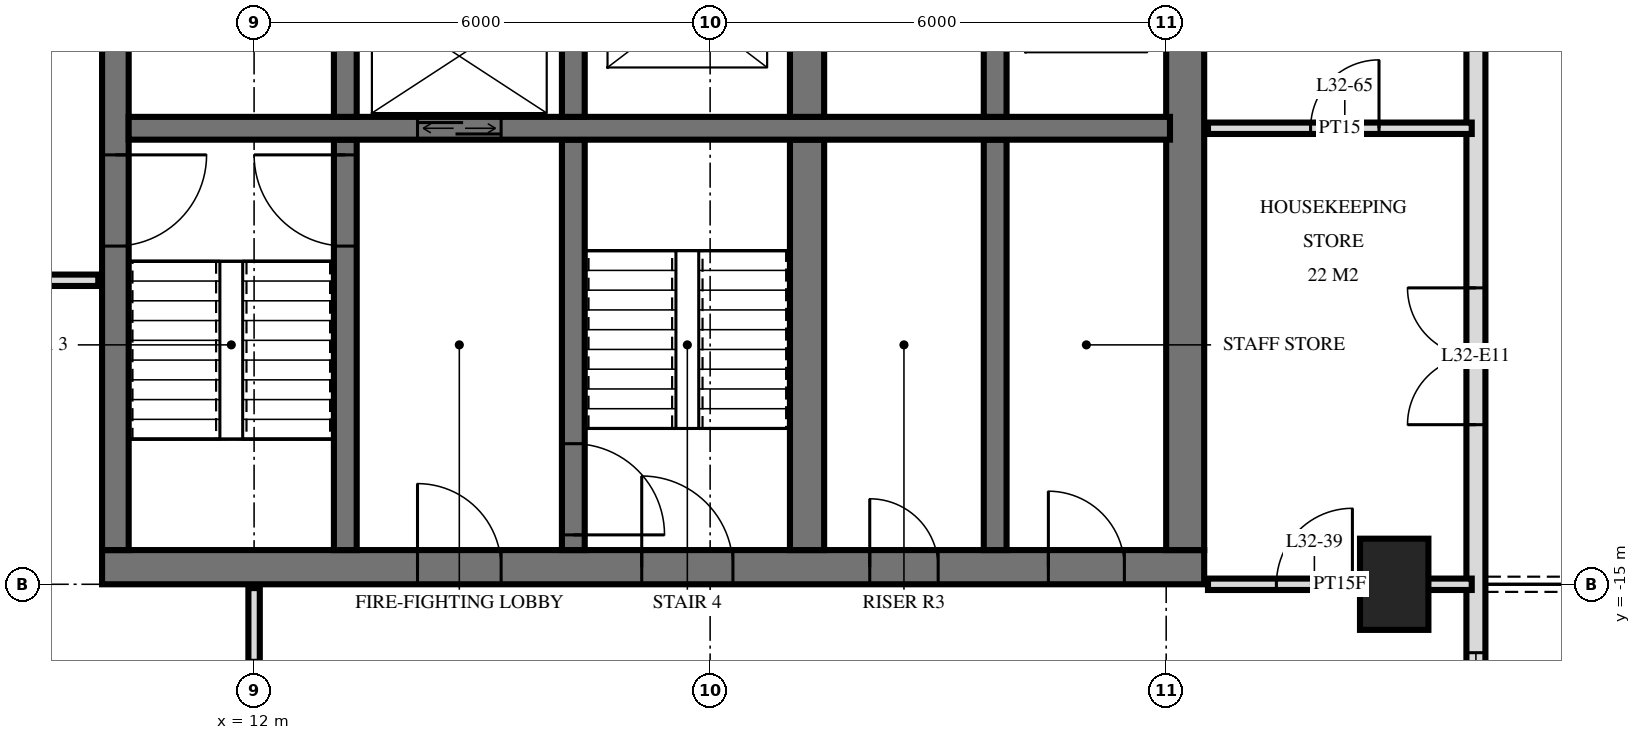
"""IFC4 building model, lengths in metres.
Left out: names, types, materials, properties, quantities, classifications, styles, units other than length and angle.
Written with IfcOpenShell. Run it as: python <this file> out.ifc"""

import sys

from ifc_helpers import new_model, si_unit, direction, frame, frame_2d, origin, origin_2d, place, context, subcontext, project, spatial, rectangle, extrude, element, fill, save


model = new_model("IFC4")
c1 = context("Model", 3, precision=1e-05, world=origin(), true_north=direction((0.0, 1.0)))
c2 = subcontext(c1, "Body", "Model", "MODEL_VIEW")
j1 = project(units=[si_unit("LENGTHUNIT", "METRE"), si_unit("PLANEANGLEUNIT", "RADIAN")], contexts=[c1])
p1 = place(None, origin())
s1 = spatial("IfcSite", under=j1, at=p1, CompositionType="ELEMENT")
p2 = place(p1, origin())
s2 = spatial("IfcBuilding", under=s1, at=p2, CompositionType="ELEMENT")
p3 = place(p2, frame((0.0, 0.0, 127.2)))
s3 = spatial("IfcBuildingStorey", under=s2, at=p3, CompositionType="ELEMENT", Elevation=127.2)
p4 = place(p3, frame((27.0, -15.0, 0.0), z_axis=(0.0, 0.0, 1.0), x_axis=(0.0, 1.0, 0.0)))
e1 = element("IfcColumn", 1, at=p4, inside=s3, PredefinedType="COLUMN", context=c2, shape_type="SweptSolid", body=[
    extrude(rectangle(XDim=1.2, YDim=0.9, at=origin_2d()), origin(), (0.0, 0.0, 1.0), 3.6),
])
p5 = place(p3, frame((10.0, -14.775, 0.0), z_axis=(0.0, 0.0, 1.0), x_axis=(1.0, 0.0, 0.0)))
e2 = element("IfcWall", 2, at=p5, inside=s3, PredefinedType="SHEAR", context=c2, shape_type="SweptSolid", body=[
    extrude(rectangle(XDim=14.5, YDim=0.45, at=frame_2d((7.25, 0.0))), origin(), (0.0, 0.0, 1.0), 3.6),
])
p6 = place(p5, frame((7.1, 0.0, 0.0)))
e3 = element("IfcOpeningElement", 3, at=p6, cuts=e2, PredefinedType="OPENING", context=c2, shape_type="SweptSolid", body=[
    extrude(rectangle(XDim=1.2, YDim=2.1, at=frame_2d((0.6, 1.05))), frame((0.0, 0.235, 0.0), z_axis=(0.0, -1.0, 0.0), x_axis=(1.0, 0.0, 0.0)), (0.0, 0.0, 1.0), 0.47),
])
p7 = place(p5, frame((4.15, 0.0, 0.0)))
e4 = element("IfcOpeningElement", 4, at=p7, cuts=e2, PredefinedType="OPENING", context=c2, shape_type="SweptSolid", body=[
    extrude(rectangle(XDim=1.1, YDim=2.1, at=frame_2d((0.55, 1.05))), frame((0.0, 0.235, 0.0), z_axis=(0.0, -1.0, 0.0), x_axis=(1.0, 0.0, 0.0)), (0.0, 0.0, 1.0), 0.47),
])
p8 = place(p5, frame((10.1, 0.0, 0.0)))
e5 = element("IfcOpeningElement", 5, at=p8, cuts=e2, PredefinedType="OPENING", context=c2, shape_type="SweptSolid", body=[
    extrude(rectangle(XDim=0.9, YDim=2.1, at=frame_2d((0.45, 1.05))), frame((0.0, 0.235, 0.0), z_axis=(0.0, -1.0, 0.0), x_axis=(1.0, 0.0, 0.0)), (0.0, 0.0, 1.0), 0.47),
])
p9 = place(p5, frame((12.45, 0.0, 0.0)))
e6 = element("IfcOpeningElement", 6, at=p9, cuts=e2, PredefinedType="OPENING", context=c2, shape_type="SweptSolid", body=[
    extrude(rectangle(XDim=1.0, YDim=2.1, at=frame_2d((0.5, 1.05))), frame((0.0, 0.235, 0.0), z_axis=(0.0, -1.0, 0.0), x_axis=(1.0, 0.0, 0.0)), (0.0, 0.0, 1.0), 0.47),
])
p10 = place(p3, frame((10.175, -14.55, 0.0), z_axis=(0.0, 0.0, 1.0), x_axis=(0.0, 1.0, 0.0)))
e7 = element("IfcWall", 7, at=p10, inside=s3, PredefinedType="SHEAR", context=c2, shape_type="SweptSolid", body=[
    extrude(rectangle(XDim=14.1, YDim=0.35, at=frame_2d((7.05, 0.0))), origin(), (0.0, 0.0, 1.0), 3.6),
])
p11 = place(p10, frame((8.4, 0.0, 0.0)))
e8 = element("IfcOpeningElement", 8, at=p11, cuts=e7, PredefinedType="OPENING", context=c2, shape_type="SweptSolid", body=[
    extrude(rectangle(XDim=1.4, YDim=2.4, at=frame_2d((0.7, 1.2))), frame((0.0, 0.185, 0.0), z_axis=(0.0, -1.0, 0.0), x_axis=(1.0, 0.0, 0.0)), (0.0, 0.0, 1.0), 0.37),
])
p12 = place(p10, frame((10.0, 0.0, 0.0)))
e9 = element("IfcOpeningElement", 9, at=p12, cuts=e7, PredefinedType="OPENING", context=c2, shape_type="SweptSolid", body=[
    extrude(rectangle(XDim=1.4, YDim=2.4, at=frame_2d((0.7, 1.2))), frame((0.0, 0.185, 0.0), z_axis=(0.0, -1.0, 0.0), x_axis=(1.0, 0.0, 0.0)), (0.0, 0.0, 1.0), 0.37),
])
p13 = place(p10, frame((4.0, 0.0, 0.0)))
e10 = element("IfcOpeningElement", 10, at=p13, cuts=e7, PredefinedType="OPENING", context=c2, shape_type="SweptSolid", body=[
    extrude(rectangle(XDim=1.2, YDim=2.1, at=frame_2d((0.6, 1.05))), frame((0.0, 0.185, 0.0), z_axis=(0.0, -1.0, 0.0), x_axis=(1.0, 0.0, 0.0)), (0.0, 0.0, 1.0), 0.37),
])
p14 = place(p3, frame((24.25, -14.55, 0.0), z_axis=(0.0, 0.0, 1.0), x_axis=(0.0, 1.0, 0.0)))
e11 = element("IfcWall", 11, at=p14, inside=s3, PredefinedType="SHEAR", context=c2, shape_type="SweptSolid", body=[
    extrude(rectangle(XDim=14.1, YDim=0.5, at=frame_2d((7.05, 0.0))), origin(), (0.0, 0.0, 1.0), 3.6),
])
p15 = place(p3, frame((10.35, -9.0, 0.0), z_axis=(0.0, 0.0, 1.0), x_axis=(1.0, 0.0, 0.0)))
e12 = element("IfcWall", 12, at=p15, inside=s3, PredefinedType="SHEAR", context=c2, shape_type="SweptSolid", body=[
    extrude(rectangle(XDim=13.7, YDim=0.3, at=frame_2d((6.85, 0.0))), origin(), (0.0, 0.0, 1.0), 3.6),
])
p16 = place(p15, frame((3.8, 0.0, 0.0)))
e13 = element("IfcOpeningElement", 13, at=p16, cuts=e12, PredefinedType="OPENING", context=c2, shape_type="SweptSolid", body=[
    extrude(rectangle(XDim=1.1, YDim=2.1, at=frame_2d((0.55, 1.05))), frame((0.0, 0.16, 0.0), z_axis=(0.0, -1.0, 0.0), x_axis=(1.0, 0.0, 0.0)), (0.0, 0.0, 1.0), 0.32),
])
p17 = place(p3, frame((13.2, -8.85, 0.0), z_axis=(0.0, 0.0, 1.0), x_axis=(0.0, 1.0, 0.0)))
e14 = element("IfcWall", 14, at=p17, inside=s3, PredefinedType="SHEAR", context=c2, shape_type="SweptSolid", body=[
    extrude(rectangle(XDim=2.3, YDim=0.3, at=frame_2d((1.15, 0.0))), origin(), (0.0, 0.0, 1.0), 3.6),
])
p18 = place(p3, frame((13.2, -14.55, 0.0), z_axis=(0.0, 0.0, 1.0), x_axis=(0.0, 1.0, 0.0)))
e15 = element("IfcWall", 15, at=p18, inside=s3, PredefinedType="SHEAR", context=c2, shape_type="SweptSolid", body=[
    extrude(rectangle(XDim=5.4, YDim=0.3, at=frame_2d((2.7, 0.0))), origin(), (0.0, 0.0, 1.0), 3.6),
])
p19 = place(p18, frame((4.0, 0.0, 0.0)))
e16 = element("IfcOpeningElement", 16, at=p19, cuts=e15, PredefinedType="OPENING", context=c2, shape_type="SweptSolid", body=[
    extrude(rectangle(XDim=1.2, YDim=2.1, at=frame_2d((0.6, 1.05))), frame((0.0, 0.16, 0.0), z_axis=(0.0, -1.0, 0.0), x_axis=(1.0, 0.0, 0.0)), (0.0, 0.0, 1.0), 0.32),
])
p20 = place(p3, frame((16.2, -8.85, 0.0), z_axis=(0.0, 0.0, 1.0), x_axis=(0.0, 1.0, 0.0)))
e17 = element("IfcWall", 17, at=p20, inside=s3, PredefinedType="SHEAR", context=c2, shape_type="SweptSolid", body=[
    extrude(rectangle(XDim=2.3, YDim=0.3, at=frame_2d((1.15, 0.0))), origin(), (0.0, 0.0, 1.0), 3.6),
])
p21 = place(p3, frame((16.2, -14.55, 0.0), z_axis=(0.0, 0.0, 1.0), x_axis=(0.0, 1.0, 0.0)))
e18 = element("IfcWall", 18, at=p21, inside=s3, PredefinedType="SHEAR", context=c2, shape_type="SweptSolid", body=[
    extrude(rectangle(XDim=5.4, YDim=0.3, at=frame_2d((2.7, 0.0))), origin(), (0.0, 0.0, 1.0), 3.6),
])
p22 = place(p21, frame((0.2, 0.0, 0.0)))
e19 = element("IfcOpeningElement", 19, at=p22, cuts=e18, PredefinedType="OPENING", context=c2, shape_type="SweptSolid", body=[
    extrude(rectangle(XDim=1.2, YDim=2.1, at=frame_2d((0.6, 1.05))), frame((0.0, 0.16, 0.0), z_axis=(0.0, -1.0, 0.0), x_axis=(1.0, 0.0, 0.0)), (0.0, 0.0, 1.0), 0.32),
])
p23 = place(p3, frame((19.275, -8.85, 0.0), z_axis=(0.0, 0.0, 1.0), x_axis=(0.0, 1.0, 0.0)))
e20 = element("IfcWall", 20, at=p23, inside=s3, PredefinedType="SHEAR", context=c2, shape_type="SweptSolid", body=[
    extrude(rectangle(XDim=2.3, YDim=0.45, at=frame_2d((1.15, 0.0))), origin(), (0.0, 0.0, 1.0), 3.6),
])
p24 = place(p3, frame((19.275, -14.55, 0.0), z_axis=(0.0, 0.0, 1.0), x_axis=(0.0, 1.0, 0.0)))
e21 = element("IfcWall", 21, at=p24, inside=s3, PredefinedType="SHEAR", context=c2, shape_type="SweptSolid", body=[
    extrude(rectangle(XDim=5.4, YDim=0.45, at=frame_2d((2.7, 0.0))), origin(), (0.0, 0.0, 1.0), 3.6),
])
p25 = place(p3, frame((21.75, -8.85, 0.0), z_axis=(0.0, 0.0, 1.0), x_axis=(0.0, 1.0, 0.0)))
e22 = element("IfcWall", 22, at=p25, inside=s3, PredefinedType="SHEAR", context=c2, shape_type="SweptSolid", body=[
    extrude(rectangle(XDim=2.3, YDim=0.3, at=frame_2d((1.15, 0.0))), origin(), (0.0, 0.0, 1.0), 3.6),
])
p26 = place(p3, frame((21.75, -14.55, 0.0), z_axis=(0.0, 0.0, 1.0), x_axis=(0.0, 1.0, 0.0)))
e23 = element("IfcWall", 23, at=p26, inside=s3, PredefinedType="SHEAR", context=c2, shape_type="SweptSolid", body=[
    extrude(rectangle(XDim=5.4, YDim=0.3, at=frame_2d((2.7, 0.0))), origin(), (0.0, 0.0, 1.0), 3.6),
])
p27 = place(p3, frame((28.075, -29.275, 0.0), z_axis=(0.0, 0.0, 1.0), x_axis=(0.0, 1.0, 0.0)))
e24 = element("IfcWall", 24, at=p27, inside=s3, PredefinedType="SOLIDWALL", context=c2, shape_type="SweptSolid", body=[
    extrude(rectangle(XDim=25.951, YDim=0.25, at=frame_2d((12.975, 0.0))), origin(), (0.0, 0.0, 1.0), 3.32),
])
p28 = place(p27, frame((0.575, 0.0, 0.0)))
e25 = element("IfcOpeningElement", 25, at=p28, cuts=e24, PredefinedType="OPENING", context=c2, shape_type="SweptSolid", body=[
    extrude(rectangle(XDim=1.8, YDim=2.4, at=frame_2d((0.9, 1.2))), frame((0.0, 0.135, 0.0), z_axis=(0.0, -1.0, 0.0), x_axis=(1.0, 0.0, 0.0)), (0.0, 0.0, 1.0), 0.27),
])
p29 = place(p27, frame((3.325, 0.0, 0.3)))
e26 = element("IfcOpeningElement", 26, at=p29, cuts=e24, PredefinedType="OPENING", context=c2, shape_type="SweptSolid", body=[
    extrude(rectangle(XDim=1.8, YDim=2.1, at=frame_2d((0.9, 1.05))), frame((0.0, 0.135, 0.0), z_axis=(0.0, -1.0, 0.0), x_axis=(1.0, 0.0, 0.0)), (0.0, 0.0, 1.0), 0.27),
])
p30 = place(p27, frame((8.275, 0.0, 0.0)))
e27 = element("IfcOpeningElement", 27, at=p30, cuts=e24, PredefinedType="OPENING", context=c2, shape_type="SweptSolid", body=[
    extrude(rectangle(XDim=1.8, YDim=2.4, at=frame_2d((0.9, 1.2))), frame((0.0, 0.135, 0.0), z_axis=(0.0, -1.0, 0.0), x_axis=(1.0, 0.0, 0.0)), (0.0, 0.0, 1.0), 0.27),
])
p31 = place(p27, frame((12.175, 0.0, 0.3)))
e28 = element("IfcOpeningElement", 28, at=p31, cuts=e24, PredefinedType="OPENING", context=c2, shape_type="SweptSolid", body=[
    extrude(rectangle(XDim=1.2, YDim=2.1, at=frame_2d((0.6, 1.05))), frame((0.0, 0.135, 0.0), z_axis=(0.0, -1.0, 0.0), x_axis=(1.0, 0.0, 0.0)), (0.0, 0.0, 1.0), 0.27),
])
p32 = place(p27, frame((16.375, 0.0, 0.0)))
e29 = element("IfcOpeningElement", 29, at=p32, cuts=e24, PredefinedType="OPENING", context=c2, shape_type="SweptSolid", body=[
    extrude(rectangle(XDim=1.8, YDim=2.4, at=frame_2d((0.9, 1.2))), frame((0.0, 0.135, 0.0), z_axis=(0.0, -1.0, 0.0), x_axis=(1.0, 0.0, 0.0)), (0.0, 0.0, 1.0), 0.27),
])
p33 = place(p3, frame((12.0, -18.0, 0.0), z_axis=(0.0, 0.0, 1.0), x_axis=(0.0, 1.0, 0.0)))
e30 = element("IfcWall", 30, at=p33, inside=s3, PredefinedType="PARTITIONING", context=c2, shape_type="SweptSolid", body=[
    extrude(rectangle(XDim=2.95, YDim=0.15, at=frame_2d((1.475, 0.0))), origin(), (0.0, 0.0, 1.0), 3.32),
])
p34 = place(p33, frame((1.0, 0.0, 0.0)))
e31 = element("IfcOpeningElement", 31, at=p34, cuts=e30, PredefinedType="OPENING", context=c2, shape_type="SweptSolid", body=[
    extrude(rectangle(XDim=1.0, YDim=2.1, at=frame_2d((0.5, 1.05))), frame((0.0, 0.085, 0.0), z_axis=(0.0, -1.0, 0.0), x_axis=(1.0, 0.0, 0.0)), (0.0, 0.0, 1.0), 0.17),
])
p35 = place(p3, frame((24.55, -15.0, 0.0), z_axis=(0.0, 0.0, 1.0), x_axis=(1.0, 0.0, 0.0)))
e32 = element("IfcWall", 32, at=p35, inside=s3, PredefinedType="PARTITIONING", context=c2, shape_type="SweptSolid", body=[
    extrude(rectangle(XDim=3.47, YDim=0.15, at=frame_2d((1.735, 0.0))), origin(), (0.0, 0.0, 1.0), 3.32),
])
p36 = place(p35, frame((0.9, 0.0, 0.0)))
e33 = element("IfcOpeningElement", 33, at=p36, cuts=e32, PredefinedType="OPENING", context=c2, shape_type="SweptSolid", body=[
    extrude(rectangle(XDim=1.0, YDim=2.1, at=frame_2d((0.5, 1.05))), frame((0.0, 0.085, 0.0), z_axis=(0.0, -1.0, 0.0), x_axis=(1.0, 0.0, 0.0)), (0.0, 0.0, 1.0), 0.17),
])
p37 = place(p3, frame((-9.95, -11.0, 0.0), z_axis=(0.0, 0.0, 1.0), x_axis=(1.0, 0.0, 0.0)))
e34 = element("IfcWall", 34, at=p37, inside=s3, PredefinedType="PARTITIONING", context=c2, shape_type="SweptSolid", body=[
    extrude(rectangle(XDim=19.9, YDim=0.15, at=frame_2d((9.95, 0.0))), origin(), (0.0, 0.0, 1.0), 3.32),
])
p38 = place(p37, frame((9.45, 0.0, 0.0)))
e35 = element("IfcOpeningElement", 35, at=p38, cuts=e34, PredefinedType="OPENING", context=c2, shape_type="SweptSolid", body=[
    extrude(rectangle(XDim=1.0, YDim=2.1, at=frame_2d((0.5, 1.05))), frame((0.0, 0.085, 0.0), z_axis=(0.0, -1.0, 0.0), x_axis=(1.0, 0.0, 0.0)), (0.0, 0.0, 1.0), 0.17),
])
p39 = place(p37, frame((3.45, 0.0, 0.0)))
e36 = element("IfcOpeningElement", 36, at=p39, cuts=e34, PredefinedType="OPENING", context=c2, shape_type="SweptSolid", body=[
    extrude(rectangle(XDim=1.0, YDim=2.1, at=frame_2d((0.5, 1.05))), frame((0.0, 0.085, 0.0), z_axis=(0.0, -1.0, 0.0), x_axis=(1.0, 0.0, 0.0)), (0.0, 0.0, 1.0), 0.17),
])
p40 = place(p3, frame((24.55, -9.0, 0.0), z_axis=(0.0, 0.0, 1.0), x_axis=(1.0, 0.0, 0.0)))
e37 = element("IfcWall", 37, at=p40, inside=s3, PredefinedType="PARTITIONING", context=c2, shape_type="SweptSolid", body=[
    extrude(rectangle(XDim=3.47, YDim=0.15, at=frame_2d((1.735, 0.0))), origin(), (0.0, 0.0, 1.0), 3.32),
])
p41 = place(p40, frame((1.35, 0.0, 0.0)))
e38 = element("IfcOpeningElement", 38, at=p41, cuts=e37, PredefinedType="OPENING", context=c2, shape_type="SweptSolid", body=[
    extrude(rectangle(XDim=0.9, YDim=2.1, at=frame_2d((0.45, 1.05))), frame((0.0, 0.085, 0.0), z_axis=(0.0, -1.0, 0.0), x_axis=(1.0, 0.0, 0.0)), (0.0, 0.0, 1.0), 0.17),
])
p42 = place(p31, origin())
e39 = element("IfcWindow", 39, at=p42, inside=s3, PartitioningType="SINGLE_PANEL", PredefinedType="WINDOW", context=c2, shape_type="SweptSolid", body=[
    extrude(rectangle(XDim=1.2, YDim=2.1, at=frame_2d((0.6, 1.05))), frame((0.0, 0.03, 0.0), z_axis=(0.0, -1.0, 0.0), x_axis=(1.0, 0.0, 0.0)), (0.0, 0.0, 1.0), 0.06),
])
fill(e28, e39)
p43 = place(p32, origin())
e40 = element("IfcDoor", 40, at=p43, inside=s3, OperationType="DOUBLE_DOOR_SINGLE_SWING", PredefinedType="DOOR", context=c2, shape_type="SweptSolid", body=[
    extrude(rectangle(XDim=1.8, YDim=2.4, at=frame_2d((0.9, 1.2))), frame((0.0, 0.025, 0.0), z_axis=(0.0, -1.0, 0.0), x_axis=(1.0, 0.0, 0.0)), (0.0, 0.0, 1.0), 0.05),
])
fill(e29, e40)
p44 = place(p16, origin())
e41 = element("IfcDoor", 41, at=p44, inside=s3, OperationType="DOUBLE_DOOR_SLIDING", PredefinedType="USERDEFINED", context=c2, shape_type="SweptSolid", body=[
    extrude(rectangle(XDim=1.1, YDim=2.1, at=frame_2d((0.55, 1.05))), frame((0.0, 0.025, 0.0), z_axis=(0.0, -1.0, 0.0), x_axis=(1.0, 0.0, 0.0)), (0.0, 0.0, 1.0), 0.05),
])
fill(e13, e41)
p45 = place(p13, frame((0.6, 0.0, 0.0), z_axis=(0.0, 0.0, 1.0), x_axis=(-1.0, 0.0, 0.0)))
e42 = element("IfcDoor", 42, at=p45, inside=s3, OperationType="SINGLE_SWING_RIGHT", PredefinedType="DOOR", context=c2, shape_type="SweptSolid", body=[
    extrude(rectangle(XDim=1.2, YDim=2.1, at=frame_2d((0.0, 1.05))), frame((0.0, -0.025, 0.0), z_axis=(0.0, 1.0, 0.0), x_axis=(-1.0, 0.0, 0.0)), (0.0, 0.0, 1.0), 0.05),
])
fill(e10, e42)
p46 = place(p6, origin())
e43 = element("IfcDoor", 43, at=p46, inside=s3, OperationType="SINGLE_SWING_RIGHT", PredefinedType="DOOR", context=c2, shape_type="SweptSolid", body=[
    extrude(rectangle(XDim=1.2, YDim=2.1, at=frame_2d((0.6, 1.05))), frame((0.0, 0.025, 0.0), z_axis=(0.0, -1.0, 0.0), x_axis=(1.0, 0.0, 0.0)), (0.0, 0.0, 1.0), 0.05),
])
fill(e3, e43)
p47 = place(p7, origin())
e44 = element("IfcDoor", 44, at=p47, inside=s3, OperationType="SINGLE_SWING_RIGHT", PredefinedType="DOOR", context=c2, shape_type="SweptSolid", body=[
    extrude(rectangle(XDim=1.1, YDim=2.1, at=frame_2d((0.55, 1.05))), frame((0.0, 0.025, 0.0), z_axis=(0.0, -1.0, 0.0), x_axis=(1.0, 0.0, 0.0)), (0.0, 0.0, 1.0), 0.05),
])
fill(e4, e44)
p48 = place(p8, origin())
e45 = element("IfcDoor", 45, at=p48, inside=s3, OperationType="SINGLE_SWING_RIGHT", PredefinedType="DOOR", context=c2, shape_type="SweptSolid", body=[
    extrude(rectangle(XDim=0.9, YDim=2.1, at=frame_2d((0.45, 1.05))), frame((0.0, 0.025, 0.0), z_axis=(0.0, -1.0, 0.0), x_axis=(1.0, 0.0, 0.0)), (0.0, 0.0, 1.0), 0.05),
])
fill(e5, e45)
p49 = place(p9, origin())
e46 = element("IfcDoor", 46, at=p49, inside=s3, OperationType="SINGLE_SWING_RIGHT", PredefinedType="DOOR", context=c2, shape_type="SweptSolid", body=[
    extrude(rectangle(XDim=1.0, YDim=2.1, at=frame_2d((0.5, 1.05))), frame((0.0, 0.025, 0.0), z_axis=(0.0, -1.0, 0.0), x_axis=(1.0, 0.0, 0.0)), (0.0, 0.0, 1.0), 0.05),
])
fill(e6, e46)
p50 = place(p19, origin())
e47 = element("IfcDoor", 47, at=p50, inside=s3, OperationType="SINGLE_SWING_LEFT", PredefinedType="DOOR", context=c2, shape_type="SweptSolid", body=[
    extrude(rectangle(XDim=1.2, YDim=2.1, at=frame_2d((0.6, 1.05))), frame((0.0, 0.025, 0.0), z_axis=(0.0, -1.0, 0.0), x_axis=(1.0, 0.0, 0.0)), (0.0, 0.0, 1.0), 0.05),
])
fill(e16, e47)
p51 = place(p22, frame((0.6, 0.0, 0.0), z_axis=(0.0, 0.0, 1.0), x_axis=(-1.0, 0.0, 0.0)))
e48 = element("IfcDoor", 48, at=p51, inside=s3, OperationType="SINGLE_SWING_LEFT", PredefinedType="DOOR", context=c2, shape_type="SweptSolid", body=[
    extrude(rectangle(XDim=1.2, YDim=2.1, at=frame_2d((0.0, 1.05))), frame((0.0, -0.025, 0.0), z_axis=(0.0, 1.0, 0.0), x_axis=(-1.0, 0.0, 0.0)), (0.0, 0.0, 1.0), 0.05),
])
fill(e19, e48)
p52 = place(p36, origin())
e49 = element("IfcDoor", 49, at=p52, inside=s3, OperationType="SINGLE_SWING_LEFT", PredefinedType="DOOR", context=c2, shape_type="SweptSolid", body=[
    extrude(rectangle(XDim=1.0, YDim=2.1, at=frame_2d((0.5, 1.05))), frame((0.0, 0.025, 0.0), z_axis=(0.0, -1.0, 0.0), x_axis=(1.0, 0.0, 0.0)), (0.0, 0.0, 1.0), 0.05),
])
fill(e33, e49)
p53 = place(p41, origin())
e50 = element("IfcDoor", 50, at=p53, inside=s3, OperationType="SINGLE_SWING_LEFT", PredefinedType="DOOR", context=c2, shape_type="SweptSolid", body=[
    extrude(rectangle(XDim=0.9, YDim=2.1, at=frame_2d((0.45, 1.05))), frame((0.0, 0.025, 0.0), z_axis=(0.0, -1.0, 0.0), x_axis=(1.0, 0.0, 0.0)), (0.0, 0.0, 1.0), 0.05),
])
fill(e38, e50)
save(model, sys.argv[1])
